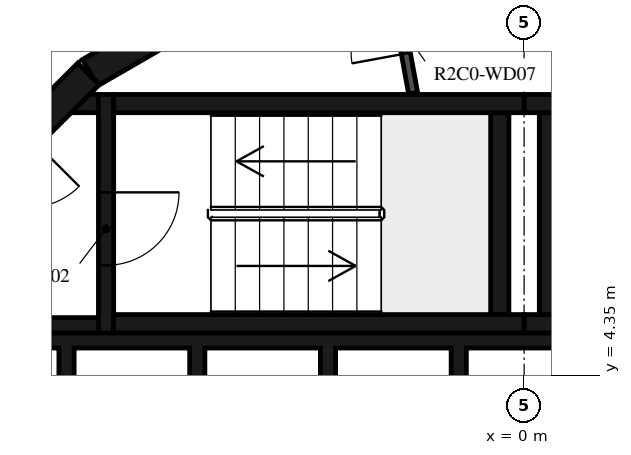
"""IFC4 building model, lengths in metres.
Left out: names, types, materials, properties, quantities, classifications, styles, units other than length and angle.
Written with IfcOpenShell. Run it as: python <this file> out.ifc"""

import sys

from ifc_helpers import new_model, si_unit, direction, frame, frame_2d, origin, place, context, subcontext, project, spatial, polyline, rectangle, outline, extrude, element, fill, save


model = new_model("IFC4")
c1 = context("Model", 3, precision=1e-05, world=origin(), true_north=direction((0.0, 1.0)))
c2 = subcontext(c1, "Body", "Model", "MODEL_VIEW")
j1 = project(units=[si_unit("LENGTHUNIT", "METRE"), si_unit("PLANEANGLEUNIT", "RADIAN")], contexts=[c1])
p1 = place(None, origin())
s1 = spatial("IfcSite", under=j1, at=p1, CompositionType="ELEMENT")
p2 = place(p1, origin())
s2 = spatial("IfcBuilding", under=s1, at=p2, CompositionType="ELEMENT")
p3 = place(p2, frame((0.0, 0.0, 97.7)))
s3 = spatial("IfcBuildingStorey", under=s2, at=p3, CompositionType="ELEMENT", Elevation=97.7)
p4 = place(p3, frame((-4.51, 10.845, 0.0), z_axis=(0.0, 0.0, 1.0), x_axis=(-0.865975092491, -0.500087131594, 0.0)))
e1 = element("IfcWall", 1, at=p4, inside=s3, PredefinedType="SHEAR", context=c2, shape_type="SweptSolid", body=[
    extrude(rectangle(XDim=3.033, YDim=0.5, at=frame_2d((1.516, 0.0))), origin(), (0.0, 0.0, 1.0), 3.12),
])
p5 = place(p3, frame((-7.164, 9.308, 0.0), z_axis=(0.0, 0.0, 1.0), x_axis=(-0.707106781187, -0.707106781187, 0.0)))
e2 = element("IfcWall", 2, at=p5, inside=s3, PredefinedType="SHEAR", context=c2, shape_type="SweptSolid", body=[
    extrude(rectangle(XDim=3.032, YDim=0.5, at=frame_2d((1.516, 0.0))), origin(), (0.0, 0.0, 1.0), 3.12),
])
p6 = place(p5, frame((1.416, 0.0, 0.0)))
e3 = element("IfcOpeningElement", 3, at=p6, cuts=e2, PredefinedType="OPENING", context=c2, shape_type="SweptSolid", body=[
    extrude(rectangle(XDim=1.2, YDim=2.1, at=frame_2d((0.6, 1.05))), frame((0.0, 0.26, 0.0), z_axis=(0.0, -1.0, 0.0), x_axis=(1.0, 0.0, 0.0)), (0.0, 0.0, 1.0), 0.52),
])
for number, where, z_axis, x_axis in (
    (4, (0.0, 5.2, 0.0), (0.0, 0.0, 1.0), (1.0, 0.0, 0.0)),
    (5, (0.0, 8.82, 0.0), (0.0, 0.0, 1.0), (1.0, 0.0, 0.0)),
):
    element("IfcWall", number, at=place(p3, frame(where, z_axis=z_axis, x_axis=x_axis)), inside=s3, PredefinedType="SHEAR", context=c2, shape_type="SweptSolid", body=[
        extrude(rectangle(XDim=6.75, YDim=0.3, at=frame_2d((3.375, 0.0))), origin(), (0.0, 0.0, 1.0), 3.12),
    ])
p7 = place(p3, frame((0.4, 5.35, 0.0), z_axis=(0.0, 0.0, 1.0), x_axis=(0.0, 1.0, 0.0)))
e6 = element("IfcWall", 6, at=p7, inside=s3, PredefinedType="SHEAR", context=c2, shape_type="SweptSolid", body=[
    extrude(rectangle(XDim=3.32, YDim=0.3, at=frame_2d((1.66, 0.0))), origin(), (0.0, 0.0, 1.0), 3.12),
])
for number, where, z_axis, x_axis in (
    (7, (-6.75, 5.2, 0.0), (0.0, 0.0, 1.0), (1.0, 0.0, 0.0)),
    (8, (-6.75, 8.82, 0.0), (0.0, 0.0, 1.0), (1.0, 0.0, 0.0)),
):
    element("IfcWall", number, at=place(p3, frame(where, z_axis=z_axis, x_axis=x_axis)), inside=s3, PredefinedType="SHEAR", context=c2, shape_type="SweptSolid", body=[
        extrude(rectangle(XDim=6.75, YDim=0.3, at=frame_2d((3.375, 0.0))), origin(), (0.0, 0.0, 1.0), 3.12),
    ])
p8 = place(p3, frame((-0.4, 5.35, 0.0), z_axis=(0.0, 0.0, 1.0), x_axis=(0.0, 1.0, 0.0)))
e9 = element("IfcWall", 9, at=p8, inside=s3, PredefinedType="SHEAR", context=c2, shape_type="SweptSolid", body=[
    extrude(rectangle(XDim=3.32, YDim=0.3, at=frame_2d((1.66, 0.0))), origin(), (0.0, 0.0, 1.0), 3.12),
])
p9 = place(p3, frame((-6.875, 8.97, 0.0), z_axis=(0.0, 0.0, 1.0), x_axis=(0.0, -1.0, 0.0)))
e10 = element("IfcWall", 10, at=p9, inside=s3, PredefinedType="SHEAR", context=c2, shape_type="SweptSolid", body=[
    extrude(rectangle(XDim=3.92, YDim=0.25, at=frame_2d((1.96, 0.0))), origin(), (0.0, 0.0, 1.0), 3.12),
])
p10 = place(p9, frame((1.61, 0.0, 0.0)))
e11 = element("IfcOpeningElement", 11, at=p10, cuts=e10, PredefinedType="OPENING", context=c2, shape_type="SweptSolid", body=[
    extrude(rectangle(XDim=1.2, YDim=2.1, at=frame_2d((0.6, 1.05))), frame((0.0, 0.135, 0.0), z_axis=(0.0, -1.0, 0.0), x_axis=(1.0, 0.0, 0.0)), (0.0, 0.0, 1.0), 0.27),
])
p11 = place(p3, frame((-7.0, 5.175, 0.0), z_axis=(0.0, 0.0, 1.0), x_axis=(-1.0, 0.0, 0.0)))
e12 = element("IfcWall", 12, at=p11, inside=s3, PredefinedType="SHEAR", context=c2, shape_type="SweptSolid", body=[
    extrude(rectangle(XDim=3.1, YDim=0.25, at=frame_2d((1.55, 0.0))), origin(), (0.0, 0.0, 1.0), 3.12),
])
p12 = place(p3, origin())
e13 = element("IfcWall", 13, at=p12, inside=s3, PredefinedType="SHEAR", context=c2, shape_type="SweptSolid", body=[
    extrude(outline(polyline([(-7.148, 8.97), (-7.0, 8.97), (-7.0, 8.67), (-7.448, 8.67), (-7.148, 8.97)])), origin(), (0.0, 0.0, 1.0), 3.12),
])
p13 = place(p3, origin())
e14 = element("IfcWall", 14, at=p13, inside=s3, PredefinedType="SHEAR", context=c2, shape_type="SweptSolid", body=[
    extrude(outline(polyline([(-9.55, 4.8), (-7.65, 4.8), (-7.65, 1.9), (-7.4, 1.9), (-7.4, 4.8), (-5.5, 4.8), (-5.5, 1.9), (-5.25, 1.9), (-5.25, 4.8), (-3.35, 4.8), (-3.35, 1.9), (-3.1, 1.9), (-3.1, 4.8), (-1.2, 4.8), (-1.2, 1.9), (-0.95, 1.9), (-0.95, 4.8), (0.95, 4.8), (0.95, 1.9), (1.2, 1.9), (1.2, 4.8), (3.1, 4.8), (3.1, 1.9), (3.35, 1.9), (3.35, 4.8), (5.25, 4.8), (5.25, 1.9), (5.5, 1.9), (5.5, 4.8), (7.4, 4.8), (7.4, 1.9), (7.65, 1.9), (7.65, 4.8), (9.55, 4.8), (9.55, 1.9), (9.8, 1.9), (9.8, 4.8), (9.8, 5.05), (-9.8, 5.05), (-9.8, 4.8), (-9.8, 1.9), (-9.55, 1.9), (-9.55, 4.8)])), origin(), (0.0, 0.0, 1.0), 3.12),
])
p14 = place(p3, frame((-1.825, 8.99, 0.0), z_axis=(0.0, 0.0, 1.0), x_axis=(-0.179955206115, 0.983674805915, 0.0)))
e15 = element("IfcWall", 15, at=p14, inside=s3, PredefinedType="PARTITIONING", context=c2, shape_type="SweptSolid", body=[
    extrude(rectangle(XDim=2.229, YDim=0.15, at=frame_2d((1.115, 0.0))), origin(), (0.0, 0.0, 1.0), 3.12),
])
p15 = place(p14, frame((0.665, 0.0, 0.0)))
e16 = element("IfcOpeningElement", 16, at=p15, cuts=e15, PredefinedType="OPENING", context=c2, shape_type="SweptSolid", body=[
    extrude(rectangle(XDim=0.9, YDim=2.1, at=frame_2d((0.45, 1.05))), frame((0.0, 0.085, 0.0), z_axis=(0.0, -1.0, 0.0), x_axis=(1.0, 0.0, 0.0)), (0.0, 0.0, 1.0), 0.17),
])
p16 = place(p3, frame((-5.198, 13.196, 0.0), z_axis=(0.0, 0.0, 1.0), x_axis=(-0.803869883159, -0.594805187394, 0.0)))
e17 = element("IfcWall", 17, at=p16, inside=s3, PredefinedType="STANDARD", context=c2, shape_type="SweptSolid", body=[
    extrude(rectangle(XDim=7.342, YDim=0.2, at=frame_2d((3.671, 0.0))), origin(), (0.0, 0.0, 1.0), 3.12),
])
p17 = place(p16, frame((5.8, 0.0, 0.0)))
e18 = element("IfcOpeningElement", 18, at=p17, cuts=e17, PredefinedType="OPENING", context=c2, shape_type="SweptSolid", body=[
    extrude(rectangle(XDim=1.0, YDim=2.1, at=frame_2d((0.5, 1.05))), frame((0.0, 0.11, 0.0), z_axis=(0.0, -1.0, 0.0), x_axis=(1.0, 0.0, 0.0)), (0.0, 0.0, 1.0), 0.22),
])
p18 = place(p10, origin())
e19 = element("IfcDoor", 19, at=p18, inside=s3, OperationType="SINGLE_SWING_LEFT", PredefinedType="DOOR", context=c2, shape_type="SweptSolid", body=[
    extrude(rectangle(XDim=1.2, YDim=2.1, at=frame_2d((0.6, 1.05))), frame((0.0, 0.025, 0.0), z_axis=(0.0, -1.0, 0.0), x_axis=(1.0, 0.0, 0.0)), (0.0, 0.0, 1.0), 0.05),
])
fill(e11, e19)
p19 = place(p15, origin())
e20 = element("IfcDoor", 20, at=p19, inside=s3, OperationType="SINGLE_SWING_RIGHT", PredefinedType="DOOR", context=c2, shape_type="SweptSolid", body=[
    extrude(rectangle(XDim=0.9, YDim=2.1, at=frame_2d((0.45, 1.05))), frame((0.0, 0.025, 0.0), z_axis=(0.0, -1.0, 0.0), x_axis=(1.0, 0.0, 0.0)), (0.0, 0.0, 1.0), 0.05),
])
fill(e16, e20)
save(model, sys.argv[1])
